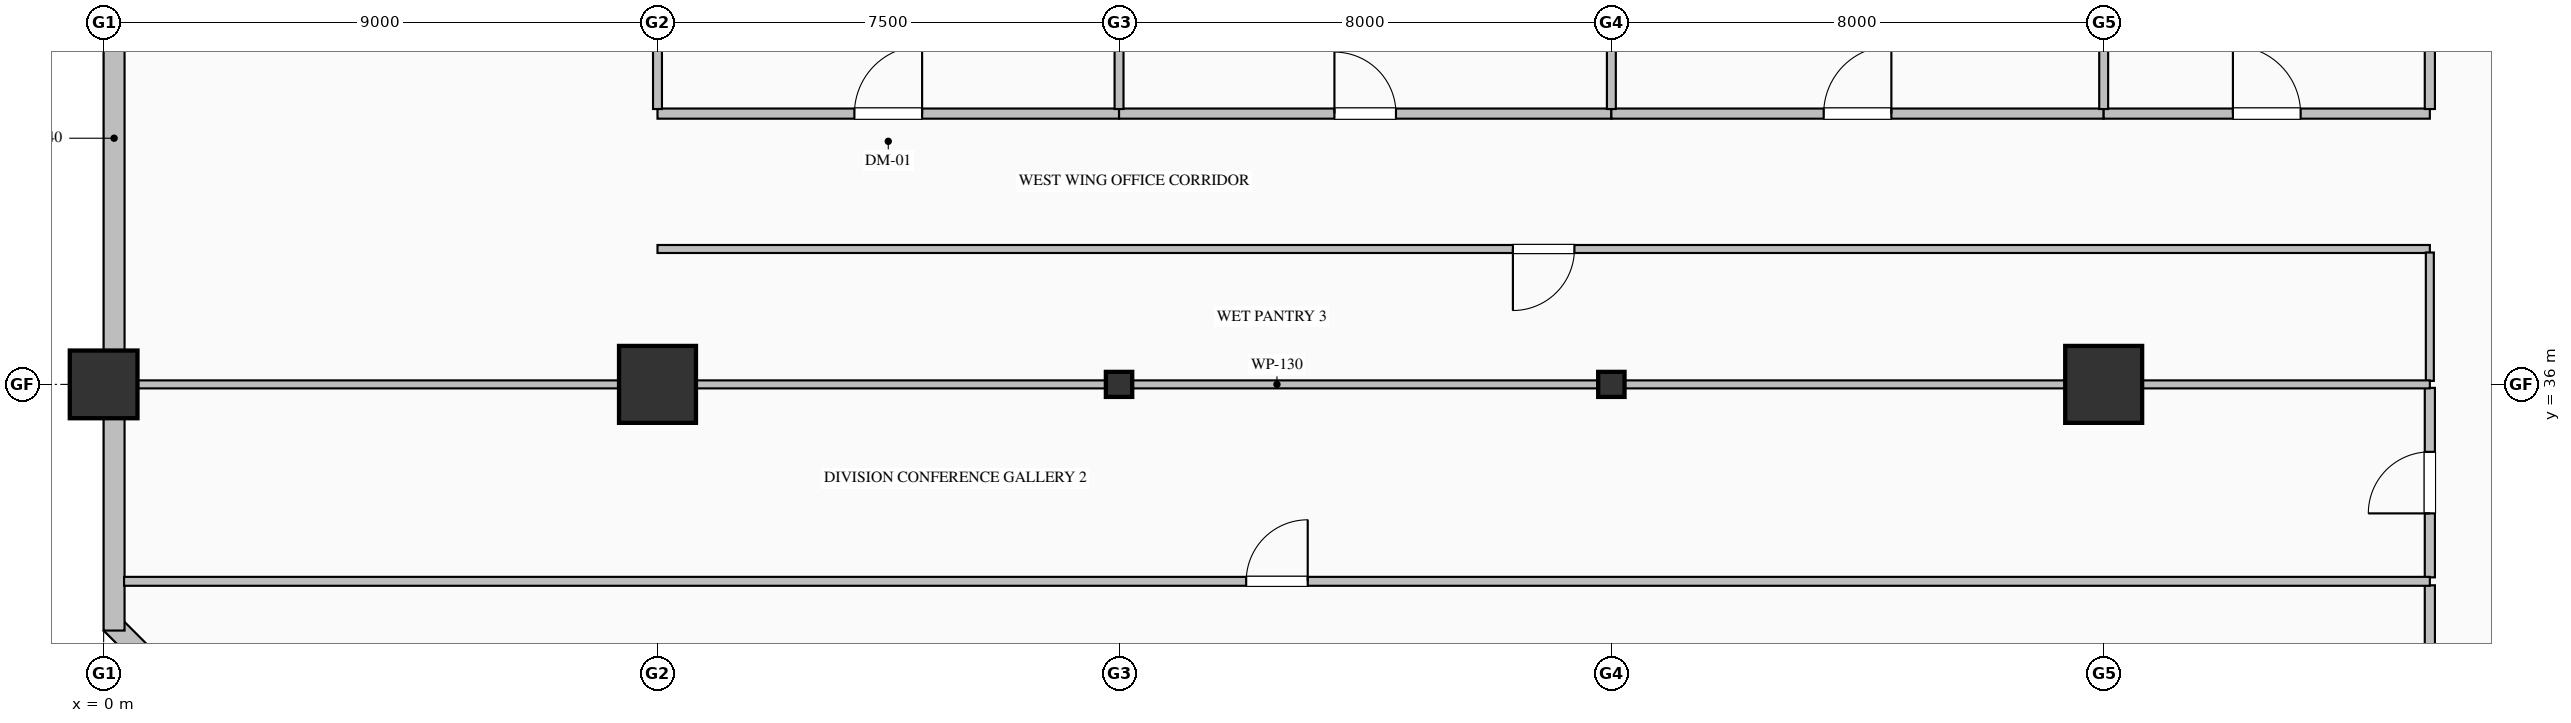
"""IFC4 building model, lengths in metres.
Left out: names, types, materials, properties, quantities, classifications, styles, units other than length and angle.
Written with IfcOpenShell. Run it as: python <this file> out.ifc"""

import sys

from ifc_helpers import new_model, si_unit, direction, frame, frame_2d, origin, origin_2d, place, context, subcontext, project, spatial, rectangle, hollow_rectangle, i_section, extrude, element, fill, save


model = new_model("IFC4")
c1 = context("Model", 3, precision=1e-05, world=origin(), true_north=direction((0.0, 1.0)))
c2 = subcontext(c1, "Body", "Model", "MODEL_VIEW")
j1 = project(units=[si_unit("LENGTHUNIT", "METRE"), si_unit("PLANEANGLEUNIT", "RADIAN")], contexts=[c1])
p1 = place(None, origin())
s1 = spatial("IfcSite", under=j1, at=p1, CompositionType="ELEMENT")
p2 = place(p1, origin())
s2 = spatial("IfcBuilding", under=s1, at=p2, CompositionType="ELEMENT")
p3 = place(p2, frame((0.0, 0.0, 52.2)))
s3 = spatial("IfcBuildingStorey", under=s2, at=p3, CompositionType="ELEMENT", Elevation=52.2)
p4 = place(p3, frame((0.0, 36.0, 0.0), z_axis=(0.0, 0.0, 1.0), x_axis=(1.0, 0.0, 0.0)))
e1 = element("IfcColumn", 1, at=p4, inside=s3, PredefinedType="COLUMN", context=c2, shape_type="SweptSolid", body=[
    extrude(hollow_rectangle(XDim=1.1, YDim=1.1, WallThickness=0.04, at=origin_2d()), origin(), (0.0, 0.0, 1.0), 4.0),
])
p5 = place(p3, frame((9.0, 36.0, 0.0), z_axis=(0.0, 0.0, 1.0), x_axis=(1.0, 0.0, 0.0)))
e2 = element("IfcColumn", 2, at=p5, inside=s3, PredefinedType="COLUMN", context=c2, shape_type="SweptSolid", body=[
    extrude(hollow_rectangle(XDim=1.25, YDim=1.25, WallThickness=0.045, at=origin_2d()), origin(), (0.0, 0.0, 1.0), 4.0),
])
for number, where, z_axis, x_axis in (
    (3, (16.5, 36.0, 0.0), (0.0, 0.0, 1.0), (1.0, 0.0, 0.0)),
    (4, (24.5, 36.0, 0.0), (0.0, 0.0, 1.0), (1.0, 0.0, 0.0)),
):
    element("IfcColumn", number, at=place(p3, frame(where, z_axis=z_axis, x_axis=x_axis)), inside=s3, PredefinedType="COLUMN", context=c2, shape_type="SweptSolid", body=[
        extrude(i_section(OverallWidth=0.407, OverallDepth=0.428, WebThickness=0.02, FlangeThickness=0.035, FilletRadius=0.022, at=origin_2d()), origin(), (0.0, 0.0, 1.0), 4.0),
    ])
p6 = place(p3, frame((32.5, 36.0, 0.0), z_axis=(0.0, 0.0, 1.0), x_axis=(1.0, 0.0, 0.0)))
e5 = element("IfcColumn", 5, at=p6, inside=s3, PredefinedType="COLUMN", context=c2, shape_type="SweptSolid", body=[
    extrude(hollow_rectangle(XDim=1.25, YDim=1.25, WallThickness=0.045, at=origin_2d()), origin(), (0.0, 0.0, 1.0), 4.0),
])
p7 = place(p3, frame((4.12, 28.12, 0.0), z_axis=(0.0, 0.0, 1.0), x_axis=(-0.707106781187, 0.707106781187, 0.0)))
e6 = element("IfcWall", 6, at=p7, inside=s3, PredefinedType="SOLIDWALL", context=c2, shape_type="SweptSolid", body=[
    extrude(rectangle(XDim=5.657, YDim=0.34, at=frame_2d((2.828, 0.0))), origin(), (0.0, 0.0, 1.0), 3.75),
])
p8 = place(p3, frame((0.17, 32.0, 0.0), z_axis=(0.0, 0.0, 1.0), x_axis=(0.0, 1.0, 0.0)))
e7 = element("IfcWall", 7, at=p8, inside=s3, PredefinedType="SOLIDWALL", context=c2, shape_type="SweptSolid", body=[
    extrude(rectangle(XDim=16.0, YDim=0.34, at=frame_2d((8.0, 0.0))), origin(), (0.0, 0.0, 1.0), 3.25),
])
p9 = place(p3, frame((9.0, 40.4, 0.0), z_axis=(0.0, 0.0, 1.0), x_axis=(1.0, 0.0, 0.0)))
e8 = element("IfcWall", 8, at=p9, inside=s3, PredefinedType="PARTITIONING", context=c2, shape_type="SweptSolid", body=[
    extrude(rectangle(XDim=7.5, YDim=0.165, at=frame_2d((3.75, 0.0))), origin(), (0.0, 0.0, 1.0), 3.75),
])
p10 = place(p9, frame((3.2, 0.0, 0.0)))
e9 = element("IfcOpeningElement", 9, at=p10, cuts=e8, PredefinedType="OPENING", context=c2, shape_type="SweptSolid", body=[
    extrude(rectangle(XDim=1.1, YDim=2.2, at=frame_2d((0.55, 1.1))), frame((0.0, 0.093, 0.0), z_axis=(0.0, -1.0, 0.0), x_axis=(1.0, 0.0, 0.0)), (0.0, 0.0, 1.0), 0.185),
])
p11 = place(p3, frame((16.5, 40.4, 0.0), z_axis=(0.0, 0.0, 1.0), x_axis=(1.0, 0.0, 0.0)))
e10 = element("IfcWall", 10, at=p11, inside=s3, PredefinedType="PARTITIONING", context=c2, shape_type="SweptSolid", body=[
    extrude(rectangle(XDim=8.0, YDim=0.165, at=frame_2d((4.0, 0.0))), origin(), (0.0, 0.0, 1.0), 3.75),
])
p12 = place(p11, frame((3.5, 0.0, 0.0)))
e11 = element("IfcOpeningElement", 11, at=p12, cuts=e10, PredefinedType="OPENING", context=c2, shape_type="SweptSolid", body=[
    extrude(rectangle(XDim=1.0, YDim=2.15, at=frame_2d((0.5, 1.075))), frame((0.0, 0.093, 0.0), z_axis=(0.0, -1.0, 0.0), x_axis=(1.0, 0.0, 0.0)), (0.0, 0.0, 1.0), 0.185),
])
p13 = place(p3, frame((24.5, 40.4, 0.0), z_axis=(0.0, 0.0, 1.0), x_axis=(1.0, 0.0, 0.0)))
e12 = element("IfcWall", 12, at=p13, inside=s3, PredefinedType="PARTITIONING", context=c2, shape_type="SweptSolid", body=[
    extrude(rectangle(XDim=8.0, YDim=0.165, at=frame_2d((4.0, 0.0))), origin(), (0.0, 0.0, 1.0), 3.75),
])
p14 = place(p13, frame((3.45, 0.0, 0.0)))
e13 = element("IfcOpeningElement", 13, at=p14, cuts=e12, PredefinedType="OPENING", context=c2, shape_type="SweptSolid", body=[
    extrude(rectangle(XDim=1.1, YDim=2.2, at=frame_2d((0.55, 1.1))), frame((0.0, 0.093, 0.0), z_axis=(0.0, -1.0, 0.0), x_axis=(1.0, 0.0, 0.0)), (0.0, 0.0, 1.0), 0.185),
])
p15 = place(p3, frame((32.5, 40.4, 0.0), z_axis=(0.0, 0.0, 1.0), x_axis=(1.0, 0.0, 0.0)))
e14 = element("IfcWall", 14, at=p15, inside=s3, PredefinedType="PARTITIONING", context=c2, shape_type="SweptSolid", body=[
    extrude(rectangle(XDim=5.3, YDim=0.165, at=frame_2d((2.65, 0.0))), origin(), (0.0, 0.0, 1.0), 3.75),
])
p16 = place(p15, frame((2.1, 0.0, 0.0)))
e15 = element("IfcOpeningElement", 15, at=p16, cuts=e14, PredefinedType="OPENING", context=c2, shape_type="SweptSolid", body=[
    extrude(rectangle(XDim=1.1, YDim=2.2, at=frame_2d((0.55, 1.1))), frame((0.0, 0.093, 0.0), z_axis=(0.0, -1.0, 0.0), x_axis=(1.0, 0.0, 0.0)), (0.0, 0.0, 1.0), 0.185),
])
p17 = place(p3, frame((37.8, 38.2, 0.0), z_axis=(0.0, 0.0, 1.0), x_axis=(-1.0, 0.0, 0.0)))
e16 = element("IfcWall", 16, at=p17, inside=s3, PredefinedType="PARTITIONING", context=c2, shape_type="SweptSolid", body=[
    extrude(rectangle(XDim=28.8, YDim=0.13, at=frame_2d((14.4, 0.0))), origin(), (0.0, 0.0, 1.0), 3.75),
])
p18 = place(p17, frame((13.9, 0.0, 0.0)))
e17 = element("IfcOpeningElement", 17, at=p18, cuts=e16, PredefinedType="OPENING", context=c2, shape_type="SweptSolid", body=[
    extrude(rectangle(XDim=1.0, YDim=2.15, at=frame_2d((0.5, 1.075))), frame((0.0, 0.075, 0.0), z_axis=(0.0, -1.0, 0.0), x_axis=(1.0, 0.0, 0.0)), (0.0, 0.0, 1.0), 0.15),
])
p19 = place(p3, frame((37.8, 40.475, 0.0), z_axis=(0.0, 0.0, 1.0), x_axis=(0.0, 1.0, 0.0)))
e18 = element("IfcWall", 18, at=p19, inside=s3, PredefinedType="PARTITIONING", context=c2, shape_type="SweptSolid", body=[
    extrude(rectangle(XDim=3.651, YDim=0.165, at=frame_2d((1.825, 0.0))), origin(), (0.0, 0.0, 1.0), 3.75),
])
p20 = place(p3, frame((37.8, 31.6, 0.0), z_axis=(0.0, 0.0, 1.0), x_axis=(0.0, 1.0, 0.0)))
e19 = element("IfcWall", 19, at=p20, inside=s3, PredefinedType="PARTITIONING", context=c2, shape_type="SweptSolid", body=[
    extrude(rectangle(XDim=1.135, YDim=0.165, at=frame_2d((0.568, 0.0))), origin(), (0.0, 0.0, 1.0), 3.75),
])
p21 = place(p3, frame((37.8, 32.865, 0.0), z_axis=(0.0, 0.0, 1.0), x_axis=(0.0, 1.0, 0.0)))
e20 = element("IfcWall", 20, at=p21, inside=s3, PredefinedType="PARTITIONING", context=c2, shape_type="SweptSolid", body=[
    extrude(rectangle(XDim=3.079, YDim=0.165, at=frame_2d((1.539, 0.0))), origin(), (0.0, 0.0, 1.0), 3.75),
])
p22 = place(p21, frame((1.039, 0.0, 0.0)))
e21 = element("IfcOpeningElement", 21, at=p22, cuts=e20, PredefinedType="OPENING", context=c2, shape_type="SweptSolid", body=[
    extrude(rectangle(XDim=1.0, YDim=2.15, at=frame_2d((0.5, 1.075))), frame((0.0, 0.093, 0.0), z_axis=(0.0, -1.0, 0.0), x_axis=(1.0, 0.0, 0.0)), (0.0, 0.0, 1.0), 0.185),
])
p23 = place(p3, frame((37.8, 36.057, 0.0), z_axis=(0.0, 0.0, 1.0), x_axis=(0.0, 1.0, 0.0)))
e22 = element("IfcWall", 22, at=p23, inside=s3, PredefinedType="PARTITIONING", context=c2, shape_type="SweptSolid", body=[
    extrude(rectangle(XDim=2.086, YDim=0.13, at=frame_2d((1.043, 0.0))), origin(), (0.0, 0.0, 1.0), 3.75),
])
p24 = place(p3, frame((9.0, 51.668, 0.0), z_axis=(0.0, 0.0, 1.0), x_axis=(0.0, -1.0, 0.0)))
e23 = element("IfcWall", 23, at=p24, inside=s3, PredefinedType="PARTITIONING", context=c2, shape_type="SweptSolid", body=[
    extrude(rectangle(XDim=11.193, YDim=0.145, at=frame_2d((5.597, 0.0))), origin(), (0.0, 0.0, 1.0), 3.042),
])
p25 = place(p24, frame((5.047, 0.0, 0.0)))
e24 = element("IfcOpeningElement", 24, at=p25, cuts=e23, PredefinedType="OPENING", context=c2, shape_type="SweptSolid", body=[
    extrude(rectangle(XDim=1.1, YDim=2.2, at=frame_2d((0.55, 1.1))), frame((0.0, 0.083, 0.0), z_axis=(0.0, -1.0, 0.0), x_axis=(1.0, 0.0, 0.0)), (0.0, 0.0, 1.0), 0.165),
])
for number, where, z_axis, x_axis in (
    (25, (16.5, 51.668, 0.0), (0.0, 0.0, 1.0), (0.0, -1.0, 0.0)),
    (26, (24.5, 51.668, 0.0), (0.0, 0.0, 1.0), (0.0, -1.0, 0.0)),
):
    element("IfcWall", number, at=place(p3, frame(where, z_axis=z_axis, x_axis=x_axis)), inside=s3, PredefinedType="PARTITIONING", context=c2, shape_type="SweptSolid", body=[
        extrude(rectangle(XDim=11.193, YDim=0.145, at=frame_2d((5.597, 0.0))), origin(), (0.0, 0.0, 1.0), 3.042),
    ])
p26 = place(p3, frame((32.5, 51.668, 0.0), z_axis=(0.0, 0.0, 1.0), x_axis=(0.0, -1.0, 0.0)))
e27 = element("IfcWall", 27, at=p26, inside=s3, PredefinedType="PARTITIONING", context=c2, shape_type="SweptSolid", body=[
    extrude(rectangle(XDim=11.193, YDim=0.145, at=frame_2d((5.597, 0.0))), origin(), (0.0, 0.0, 1.0), 3.75),
])
p27 = place(p3, frame((0.332, 32.8, 0.0), z_axis=(0.0, 0.0, 1.0), x_axis=(1.0, 0.0, 0.0)))
e28 = element("IfcWall", 28, at=p27, inside=s3, PredefinedType="PARTITIONING", context=c2, shape_type="SweptSolid", body=[
    extrude(rectangle(XDim=37.468, YDim=0.145, at=frame_2d((18.734, 0.0))), origin(), (0.0, 0.0, 1.0), 3.75),
])
p28 = place(p27, frame((18.234, 0.0, 0.0)))
e29 = element("IfcOpeningElement", 29, at=p28, cuts=e28, PredefinedType="OPENING", context=c2, shape_type="SweptSolid", body=[
    extrude(rectangle(XDim=1.0, YDim=2.15, at=frame_2d((0.5, 1.075))), frame((0.0, 0.083, 0.0), z_axis=(0.0, -1.0, 0.0), x_axis=(1.0, 0.0, 0.0)), (0.0, 0.0, 1.0), 0.165),
])
p29 = place(p3, frame((0.332, 36.0, 0.0), z_axis=(0.0, 0.0, 1.0), x_axis=(1.0, 0.0, 0.0)))
e30 = element("IfcWall", 30, at=p29, inside=s3, PredefinedType="PARTITIONING", context=c2, shape_type="SweptSolid", body=[
    extrude(rectangle(XDim=37.468, YDim=0.13, at=frame_2d((18.734, 0.0))), origin(), (0.0, 0.0, 1.0), 3.042),
])
p30 = place(p10, origin())
e31 = element("IfcDoor", 31, at=p30, inside=s3, OperationType="SINGLE_SWING_RIGHT", PredefinedType="DOOR", context=c2, shape_type="SweptSolid", body=[
    extrude(rectangle(XDim=1.1, YDim=2.2, at=frame_2d((0.55, 1.1))), frame((0.0, 0.025, 0.0), z_axis=(0.0, -1.0, 0.0), x_axis=(1.0, 0.0, 0.0)), (0.0, 0.0, 1.0), 0.05),
])
fill(e9, e31)
p31 = place(p12, origin())
e32 = element("IfcDoor", 32, at=p31, inside=s3, OperationType="SINGLE_SWING_LEFT", PredefinedType="DOOR", context=c2, shape_type="SweptSolid", body=[
    extrude(rectangle(XDim=1.0, YDim=2.15, at=frame_2d((0.5, 1.075))), frame((0.0, 0.025, 0.0), z_axis=(0.0, -1.0, 0.0), x_axis=(1.0, 0.0, 0.0)), (0.0, 0.0, 1.0), 0.05),
])
fill(e11, e32)
p32 = place(p14, origin())
e33 = element("IfcDoor", 33, at=p32, inside=s3, OperationType="SINGLE_SWING_RIGHT", PredefinedType="DOOR", context=c2, shape_type="SweptSolid", body=[
    extrude(rectangle(XDim=1.1, YDim=2.2, at=frame_2d((0.55, 1.1))), frame((0.0, 0.025, 0.0), z_axis=(0.0, -1.0, 0.0), x_axis=(1.0, 0.0, 0.0)), (0.0, 0.0, 1.0), 0.05),
])
fill(e13, e33)
p33 = place(p16, origin())
e34 = element("IfcDoor", 34, at=p33, inside=s3, OperationType="SINGLE_SWING_LEFT", PredefinedType="DOOR", context=c2, shape_type="SweptSolid", body=[
    extrude(rectangle(XDim=1.1, YDim=2.2, at=frame_2d((0.55, 1.1))), frame((0.0, 0.025, 0.0), z_axis=(0.0, -1.0, 0.0), x_axis=(1.0, 0.0, 0.0)), (0.0, 0.0, 1.0), 0.05),
])
fill(e15, e34)
p34 = place(p28, origin())
e35 = element("IfcDoor", 35, at=p34, inside=s3, OperationType="SINGLE_SWING_RIGHT", PredefinedType="DOOR", context=c2, shape_type="SweptSolid", body=[
    extrude(rectangle(XDim=1.0, YDim=2.15, at=frame_2d((0.5, 1.075))), frame((0.0, 0.025, 0.0), z_axis=(0.0, -1.0, 0.0), x_axis=(1.0, 0.0, 0.0)), (0.0, 0.0, 1.0), 0.05),
])
fill(e29, e35)
p35 = place(p22, origin())
e36 = element("IfcDoor", 36, at=p35, inside=s3, OperationType="SINGLE_SWING_LEFT", PredefinedType="DOOR", context=c2, shape_type="SweptSolid", body=[
    extrude(rectangle(XDim=1.0, YDim=2.15, at=frame_2d((0.5, 1.075))), frame((0.0, 0.025, 0.0), z_axis=(0.0, -1.0, 0.0), x_axis=(1.0, 0.0, 0.0)), (0.0, 0.0, 1.0), 0.05),
])
fill(e21, e36)
p36 = place(p18, origin())
e37 = element("IfcDoor", 37, at=p36, inside=s3, OperationType="SINGLE_SWING_RIGHT", PredefinedType="DOOR", context=c2, shape_type="SweptSolid", body=[
    extrude(rectangle(XDim=1.0, YDim=2.15, at=frame_2d((0.5, 1.075))), frame((0.0, 0.025, 0.0), z_axis=(0.0, -1.0, 0.0), x_axis=(1.0, 0.0, 0.0)), (0.0, 0.0, 1.0), 0.05),
])
fill(e17, e37)
save(model, sys.argv[1])
